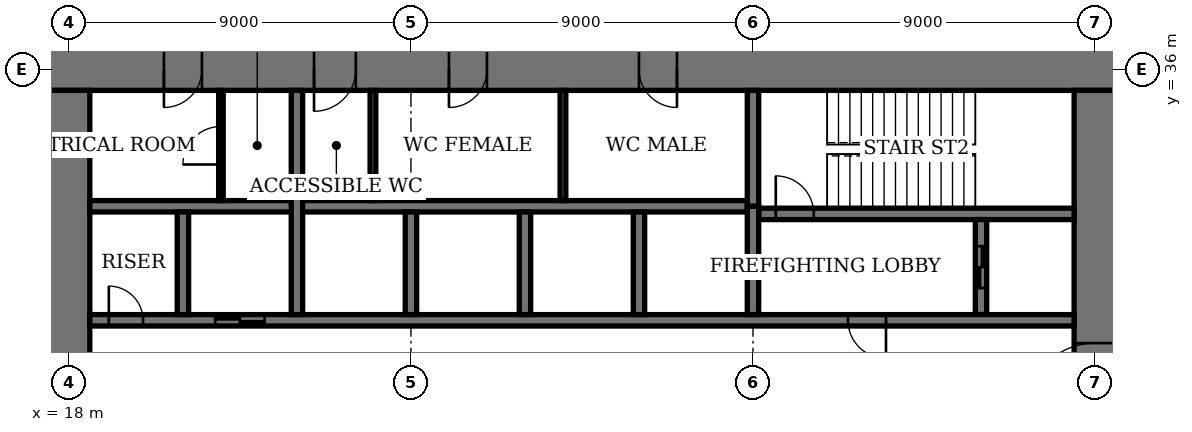
"""IFC4 building model, lengths in metres.
Left out: names, types, materials, properties, quantities, classifications, styles, units other than length and angle.
Written with IfcOpenShell. Run it as: python <this file> out.ifc"""

import sys

from ifc_helpers import new_model, si_unit, direction, frame, frame_2d, origin, place, context, subcontext, project, spatial, rectangle, extrude, element, fill, save


model = new_model("IFC4")
c1 = context("Model", 3, precision=1e-05, world=origin(), true_north=direction((0.0, 1.0)))
c2 = subcontext(c1, "Body", "Model", "MODEL_VIEW")
j1 = project(units=[si_unit("LENGTHUNIT", "METRE"), si_unit("PLANEANGLEUNIT", "RADIAN")], contexts=[c1])
p1 = place(None, origin())
s1 = spatial("IfcSite", under=j1, at=p1, CompositionType="ELEMENT")
p2 = place(p1, origin())
s2 = spatial("IfcBuilding", under=s1, at=p2, CompositionType="ELEMENT")
p3 = place(p2, frame((0.0, 0.0, 59.8)))
s3 = spatial("IfcBuildingStorey", under=s2, at=p3, CompositionType="ELEMENT", Elevation=59.8)
p4 = place(p3, frame((45.55, 36.0, 0.0), z_axis=(0.0, 0.0, 1.0), x_axis=(-1.0, 0.0, 0.0)))
e1 = element("IfcWall", 1, at=p4, inside=s3, PredefinedType="SHEAR", context=c2, shape_type="SweptSolid", body=[
    extrude(rectangle(XDim=28.1, YDim=1.1, at=frame_2d((14.05, 0.0))), origin(), (0.0, 0.0, 1.0), 4.0),
])
p5 = place(p4, frame((11.55, 0.0, 0.0)))
e2 = element("IfcOpeningElement", 2, at=p5, cuts=e1, PredefinedType="OPENING", context=c2, shape_type="SweptSolid", body=[
    extrude(rectangle(XDim=1.0, YDim=2.4, at=frame_2d((0.5, 1.2))), frame((0.0, 0.56, 0.0), z_axis=(0.0, -1.0, 0.0), x_axis=(1.0, 0.0, 0.0)), (0.0, 0.0, 1.0), 1.12),
])
p6 = place(p4, frame((16.55, 0.0, 0.0)))
e3 = element("IfcOpeningElement", 3, at=p6, cuts=e1, PredefinedType="OPENING", context=c2, shape_type="SweptSolid", body=[
    extrude(rectangle(XDim=1.0, YDim=2.4, at=frame_2d((0.5, 1.2))), frame((0.0, 0.56, 0.0), z_axis=(0.0, -1.0, 0.0), x_axis=(1.0, 0.0, 0.0)), (0.0, 0.0, 1.0), 1.12),
])
p7 = place(p4, frame((20.0, 0.0, 0.0)))
e4 = element("IfcOpeningElement", 4, at=p7, cuts=e1, PredefinedType="OPENING", context=c2, shape_type="SweptSolid", body=[
    extrude(rectangle(XDim=1.1, YDim=2.4, at=frame_2d((0.55, 1.2))), frame((0.0, 0.56, 0.0), z_axis=(0.0, -1.0, 0.0), x_axis=(1.0, 0.0, 0.0)), (0.0, 0.0, 1.0), 1.12),
])
p8 = place(p4, frame((24.05, 0.0, 0.0)))
e5 = element("IfcOpeningElement", 5, at=p8, cuts=e1, PredefinedType="OPENING", context=c2, shape_type="SweptSolid", body=[
    extrude(rectangle(XDim=1.0, YDim=2.4, at=frame_2d((0.5, 1.2))), frame((0.0, 0.56, 0.0), z_axis=(0.0, -1.0, 0.0), x_axis=(1.0, 0.0, 0.0)), (0.0, 0.0, 1.0), 1.12),
])
p9 = place(p3, frame((18.0, 35.45, 0.0), z_axis=(0.0, 0.0, 1.0), x_axis=(0.0, -1.0, 0.0)))
e6 = element("IfcWall", 6, at=p9, inside=s3, PredefinedType="SHEAR", context=c2, shape_type="SweptSolid", body=[
    extrude(rectangle(XDim=16.9, YDim=1.1, at=frame_2d((8.45, 0.0))), origin(), (0.0, 0.0, 1.0), 4.0),
])
p10 = place(p9, frame((8.45, 0.0, 0.0)))
e7 = element("IfcOpeningElement", 7, at=p10, cuts=e6, PredefinedType="OPENING", context=c2, shape_type="SweptSolid", body=[
    extrude(rectangle(XDim=1.8, YDim=2.4, at=frame_2d((0.9, 1.2))), frame((0.0, 0.56, 0.0), z_axis=(0.0, -1.0, 0.0), x_axis=(1.0, 0.0, 0.0)), (0.0, 0.0, 1.0), 1.12),
])
p11 = place(p3, frame((45.0, 18.55, 0.0), z_axis=(0.0, 0.0, 1.0), x_axis=(0.0, 1.0, 0.0)))
e8 = element("IfcWall", 8, at=p11, inside=s3, PredefinedType="SHEAR", context=c2, shape_type="SweptSolid", body=[
    extrude(rectangle(XDim=16.9, YDim=1.1, at=frame_2d((8.45, 0.0))), origin(), (0.0, 0.0, 1.0), 4.0),
])
p12 = place(p11, frame((8.45, 0.0, 0.0)))
e9 = element("IfcOpeningElement", 9, at=p12, cuts=e8, PredefinedType="OPENING", context=c2, shape_type="SweptSolid", body=[
    extrude(rectangle(XDim=1.8, YDim=2.4, at=frame_2d((0.9, 1.2))), frame((0.0, 0.56, 0.0), z_axis=(0.0, -1.0, 0.0), x_axis=(1.0, 0.0, 0.0)), (0.0, 0.0, 1.0), 1.12),
])
p13 = place(p3, frame((36.15, 32.2, 0.0), z_axis=(0.0, 0.0, 1.0), x_axis=(1.0, 0.0, 0.0)))
e10 = element("IfcWall", 10, at=p13, inside=s3, PredefinedType="SHEAR", context=c2, shape_type="SweptSolid", body=[
    extrude(rectangle(XDim=8.3, YDim=0.3, at=frame_2d((4.15, 0.0))), origin(), (0.0, 0.0, 1.0), 4.0),
])
p14 = place(p13, frame((0.45, 0.0, 0.0)))
e11 = element("IfcOpeningElement", 11, at=p14, cuts=e10, PredefinedType="OPENING", context=c2, shape_type="SweptSolid", body=[
    extrude(rectangle(XDim=1.0, YDim=2.4, at=frame_2d((0.5, 1.2))), frame((0.0, 0.16, 0.0), z_axis=(0.0, -1.0, 0.0), x_axis=(1.0, 0.0, 0.0)), (0.0, 0.0, 1.0), 0.32),
])
p15 = place(p3, frame((36.0, 32.4, 0.0), z_axis=(0.0, 0.0, 1.0), x_axis=(0.0, 1.0, 0.0)))
e12 = element("IfcWall", 12, at=p15, inside=s3, PredefinedType="SHEAR", context=c2, shape_type="SweptSolid", body=[
    extrude(rectangle(XDim=3.05, YDim=0.3, at=frame_2d((1.525, 0.0))), origin(), (0.0, 0.0, 1.0), 4.0),
])
p16 = place(p3, frame((42.0, 29.55, 0.0), z_axis=(0.0, 0.0, 1.0), x_axis=(0.0, 1.0, 0.0)))
e13 = element("IfcWall", 13, at=p16, inside=s3, PredefinedType="SHEAR", context=c2, shape_type="SweptSolid", body=[
    extrude(rectangle(XDim=2.5, YDim=0.3, at=frame_2d((1.25, 0.0))), origin(), (0.0, 0.0, 1.0), 4.0),
])
p17 = place(p16, frame((0.7, 0.0, 0.0)))
e14 = element("IfcOpeningElement", 14, at=p17, cuts=e13, PredefinedType="OPENING", context=c2, shape_type="SweptSolid", body=[
    extrude(rectangle(XDim=1.1, YDim=2.4, at=frame_2d((0.55, 1.2))), frame((0.0, 0.16, 0.0), z_axis=(0.0, -1.0, 0.0), x_axis=(1.0, 0.0, 0.0)), (0.0, 0.0, 1.0), 0.32),
])
p18 = place(p3, frame((18.55, 29.4, 0.0), z_axis=(0.0, 0.0, 1.0), x_axis=(1.0, 0.0, 0.0)))
e15 = element("IfcWall", 15, at=p18, inside=s3, PredefinedType="SHEAR", context=c2, shape_type="SweptSolid", body=[
    extrude(rectangle(XDim=25.9, YDim=0.3, at=frame_2d((12.95, 0.0))), origin(), (0.0, 0.0, 1.0), 4.0),
])
p19 = place(p18, frame((19.95, 0.0, 0.0)))
e16 = element("IfcOpeningElement", 16, at=p19, cuts=e15, PredefinedType="OPENING", context=c2, shape_type="SweptSolid", body=[
    extrude(rectangle(XDim=1.0, YDim=2.4, at=frame_2d((0.5, 1.2))), frame((0.0, 0.16, 0.0), z_axis=(0.0, -1.0, 0.0), x_axis=(1.0, 0.0, 0.0)), (0.0, 0.0, 1.0), 0.32),
])
p20 = place(p18, frame((0.5, 0.0, 0.0)))
e17 = element("IfcOpeningElement", 17, at=p20, cuts=e15, PredefinedType="OPENING", context=c2, shape_type="SweptSolid", body=[
    extrude(rectangle(XDim=0.9, YDim=2.1, at=frame_2d((0.45, 1.05))), frame((0.0, 0.16, 0.0), z_axis=(0.0, -1.0, 0.0), x_axis=(1.0, 0.0, 0.0)), (0.0, 0.0, 1.0), 0.32),
])
p21 = place(p18, frame((3.3, 0.0, 0.0)))
e18 = element("IfcOpeningElement", 18, at=p21, cuts=e15, PredefinedType="OPENING", context=c2, shape_type="SweptSolid", body=[
    extrude(rectangle(XDim=1.3, YDim=2.4, at=frame_2d((0.65, 1.2))), frame((0.0, 0.16, 0.0), z_axis=(0.0, -1.0, 0.0), x_axis=(1.0, 0.0, 0.0)), (0.0, 0.0, 1.0), 0.32),
])
p22 = place(p3, frame((18.55, 32.4, 0.0), z_axis=(0.0, 0.0, 1.0), x_axis=(1.0, 0.0, 0.0)))
e19 = element("IfcWall", 19, at=p22, inside=s3, PredefinedType="SHEAR", context=c2, shape_type="SweptSolid", body=[
    extrude(rectangle(XDim=17.3, YDim=0.3, at=frame_2d((8.65, 0.0))), origin(), (0.0, 0.0, 1.0), 4.0),
])
for number, where, z_axis, x_axis in (
    (20, (33.0, 29.55, 0.0), (0.0, 0.0, 1.0), (0.0, 1.0, 0.0)),
    (21, (30.0, 29.55, 0.0), (0.0, 0.0, 1.0), (0.0, 1.0, 0.0)),
    (22, (27.0, 29.55, 0.0), (0.0, 0.0, 1.0), (0.0, 1.0, 0.0)),
):
    element("IfcWall", number, at=place(p3, frame(where, z_axis=z_axis, x_axis=x_axis)), inside=s3, PredefinedType="SHEAR", context=c2, shape_type="SweptSolid", body=[
        extrude(rectangle(XDim=2.7, YDim=0.3, at=frame_2d((1.35, 0.0))), origin(), (0.0, 0.0, 1.0), 4.0),
    ])
p23 = place(p3, frame((24.0, 29.55, 0.0), z_axis=(0.0, 0.0, 1.0), x_axis=(0.0, 1.0, 0.0)))
e23 = element("IfcWall", 23, at=p23, inside=s3, PredefinedType="SHEAR", context=c2, shape_type="SweptSolid", body=[
    extrude(rectangle(XDim=5.9, YDim=0.3, at=frame_2d((2.95, 0.0))), origin(), (0.0, 0.0, 1.0), 4.0),
])
p24 = place(p3, frame((21.0, 29.55, 0.0), z_axis=(0.0, 0.0, 1.0), x_axis=(0.0, 1.0, 0.0)))
e24 = element("IfcWall", 24, at=p24, inside=s3, PredefinedType="SHEAR", context=c2, shape_type="SweptSolid", body=[
    extrude(rectangle(XDim=2.7, YDim=0.3, at=frame_2d((1.35, 0.0))), origin(), (0.0, 0.0, 1.0), 4.0),
])
p25 = place(p3, frame((36.0, 29.55, 0.0), z_axis=(0.0, 0.0, 1.0), x_axis=(0.0, 1.0, 0.0)))
e25 = element("IfcWall", 25, at=p25, inside=s3, PredefinedType="SHEAR", context=c2, shape_type="SweptSolid", body=[
    extrude(rectangle(XDim=2.85, YDim=0.3, at=frame_2d((1.425, 0.0))), origin(), (0.0, 0.0, 1.0), 4.0),
])
for number, where, z_axis, x_axis in (
    (26, (31.0, 32.55, 0.0), (0.0, 0.0, 1.0), (0.0, 1.0, 0.0)),
    (27, (26.0, 32.55, 0.0), (0.0, 0.0, 1.0), (0.0, 1.0, 0.0)),
):
    element("IfcWall", number, at=place(p3, frame(where, z_axis=z_axis, x_axis=x_axis)), inside=s3, PredefinedType="PARTITIONING", context=c2, shape_type="SweptSolid", body=[
        extrude(rectangle(XDim=2.9, YDim=0.15, at=frame_2d((1.45, 0.0))), origin(), (0.0, 0.0, 1.0), 3.75),
    ])
p26 = place(p3, frame((22.0, 32.55, 0.0), z_axis=(0.0, 0.0, 1.0), x_axis=(0.0, 1.0, 0.0)))
e28 = element("IfcWall", 28, at=p26, inside=s3, PredefinedType="PARTITIONING", context=c2, shape_type="SweptSolid", body=[
    extrude(rectangle(XDim=2.9, YDim=0.12, at=frame_2d((1.45, 0.0))), origin(), (0.0, 0.0, 1.0), 3.75),
])
p27 = place(p26, frame((0.95, 0.0, 0.0)))
e29 = element("IfcOpeningElement", 29, at=p27, cuts=e28, PredefinedType="OPENING", context=c2, shape_type="SweptSolid", body=[
    extrude(rectangle(XDim=1.0, YDim=2.4, at=frame_2d((0.5, 1.2))), frame((0.0, 0.07, 0.0), z_axis=(0.0, -1.0, 0.0), x_axis=(1.0, 0.0, 0.0)), (0.0, 0.0, 1.0), 0.14),
])
p28 = place(p12, origin())
e30 = element("IfcDoor", 30, at=p28, inside=s3, OperationType="DOUBLE_DOOR_DOUBLE_SWING", PredefinedType="DOOR", context=c2, shape_type="SweptSolid", body=[
    extrude(rectangle(XDim=1.8, YDim=2.4, at=frame_2d((0.9, 1.2))), frame((0.0, 0.03, 0.0), z_axis=(0.0, -1.0, 0.0), x_axis=(1.0, 0.0, 0.0)), (0.0, 0.0, 1.0), 0.06),
    extrude(rectangle(XDim=0.04, YDim=2.4, at=frame_2d((0.02, 1.2))), frame((0.0, 0.55, 0.0), z_axis=(0.0, -1.0, 0.0), x_axis=(1.0, 0.0, 0.0)), (0.0, 0.0, 1.0), 1.1),
    extrude(rectangle(XDim=0.04, YDim=2.4, at=frame_2d((1.78, 1.2))), frame((0.0, 0.55, 0.0), z_axis=(0.0, -1.0, 0.0), x_axis=(1.0, 0.0, 0.0)), (0.0, 0.0, 1.0), 1.1),
    extrude(rectangle(XDim=1.8, YDim=0.04, at=frame_2d((0.9, 2.38))), frame((0.0, 0.55, 0.0), z_axis=(0.0, -1.0, 0.0), x_axis=(1.0, 0.0, 0.0)), (0.0, 0.0, 1.0), 1.1),
])
fill(e9, e30)
p29 = place(p5, origin())
e31 = element("IfcDoor", 31, at=p29, inside=s3, OperationType="SINGLE_SWING_RIGHT", PredefinedType="DOOR", context=c2, shape_type="SweptSolid", body=[
    extrude(rectangle(XDim=1.0, YDim=2.4, at=frame_2d((0.5, 1.2))), frame((0.0, 0.025, 0.0), z_axis=(0.0, -1.0, 0.0), x_axis=(1.0, 0.0, 0.0)), (0.0, 0.0, 1.0), 0.05),
    extrude(rectangle(XDim=0.04, YDim=2.4, at=frame_2d((0.02, 1.2))), frame((0.0, 0.4, 0.0), z_axis=(0.0, -1.0, 0.0), x_axis=(1.0, 0.0, 0.0)), (0.0, 0.0, 1.0), 0.8),
    extrude(rectangle(XDim=0.04, YDim=2.4, at=frame_2d((0.98, 1.2))), frame((0.0, 0.4, 0.0), z_axis=(0.0, -1.0, 0.0), x_axis=(1.0, 0.0, 0.0)), (0.0, 0.0, 1.0), 0.8),
    extrude(rectangle(XDim=1.0, YDim=0.04, at=frame_2d((0.5, 2.38))), frame((0.0, 0.4, 0.0), z_axis=(0.0, -1.0, 0.0), x_axis=(1.0, 0.0, 0.0)), (0.0, 0.0, 1.0), 0.8),
])
fill(e2, e31)
p30 = place(p6, origin())
e32 = element("IfcDoor", 32, at=p30, inside=s3, OperationType="SINGLE_SWING_LEFT", PredefinedType="DOOR", context=c2, shape_type="SweptSolid", body=[
    extrude(rectangle(XDim=1.0, YDim=2.4, at=frame_2d((0.5, 1.2))), frame((0.0, 0.025, 0.0), z_axis=(0.0, -1.0, 0.0), x_axis=(1.0, 0.0, 0.0)), (0.0, 0.0, 1.0), 0.05),
    extrude(rectangle(XDim=0.04, YDim=2.4, at=frame_2d((0.02, 1.2))), frame((0.0, 0.4, 0.0), z_axis=(0.0, -1.0, 0.0), x_axis=(1.0, 0.0, 0.0)), (0.0, 0.0, 1.0), 0.8),
    extrude(rectangle(XDim=0.04, YDim=2.4, at=frame_2d((0.98, 1.2))), frame((0.0, 0.4, 0.0), z_axis=(0.0, -1.0, 0.0), x_axis=(1.0, 0.0, 0.0)), (0.0, 0.0, 1.0), 0.8),
    extrude(rectangle(XDim=1.0, YDim=0.04, at=frame_2d((0.5, 2.38))), frame((0.0, 0.4, 0.0), z_axis=(0.0, -1.0, 0.0), x_axis=(1.0, 0.0, 0.0)), (0.0, 0.0, 1.0), 0.8),
])
fill(e3, e32)
p31 = place(p7, origin())
e33 = element("IfcDoor", 33, at=p31, inside=s3, OperationType="SINGLE_SWING_LEFT", PredefinedType="DOOR", context=c2, shape_type="SweptSolid", body=[
    extrude(rectangle(XDim=1.1, YDim=2.4, at=frame_2d((0.55, 1.2))), frame((0.0, 0.025, 0.0), z_axis=(0.0, -1.0, 0.0), x_axis=(1.0, 0.0, 0.0)), (0.0, 0.0, 1.0), 0.05),
    extrude(rectangle(XDim=0.04, YDim=2.4, at=frame_2d((0.02, 1.2))), frame((0.0, 0.44, 0.0), z_axis=(0.0, -1.0, 0.0), x_axis=(1.0, 0.0, 0.0)), (0.0, 0.0, 1.0), 0.88),
    extrude(rectangle(XDim=0.04, YDim=2.4, at=frame_2d((1.08, 1.2))), frame((0.0, 0.44, 0.0), z_axis=(0.0, -1.0, 0.0), x_axis=(1.0, 0.0, 0.0)), (0.0, 0.0, 1.0), 0.88),
    extrude(rectangle(XDim=1.1, YDim=0.04, at=frame_2d((0.55, 2.38))), frame((0.0, 0.44, 0.0), z_axis=(0.0, -1.0, 0.0), x_axis=(1.0, 0.0, 0.0)), (0.0, 0.0, 1.0), 0.88),
])
fill(e4, e33)
p32 = place(p8, origin())
e34 = element("IfcDoor", 34, at=p32, inside=s3, OperationType="SINGLE_SWING_LEFT", PredefinedType="DOOR", context=c2, shape_type="SweptSolid", body=[
    extrude(rectangle(XDim=1.0, YDim=2.4, at=frame_2d((0.5, 1.2))), frame((0.0, 0.025, 0.0), z_axis=(0.0, -1.0, 0.0), x_axis=(1.0, 0.0, 0.0)), (0.0, 0.0, 1.0), 0.05),
    extrude(rectangle(XDim=0.04, YDim=2.4, at=frame_2d((0.02, 1.2))), frame((0.0, 0.4, 0.0), z_axis=(0.0, -1.0, 0.0), x_axis=(1.0, 0.0, 0.0)), (0.0, 0.0, 1.0), 0.8),
    extrude(rectangle(XDim=0.04, YDim=2.4, at=frame_2d((0.98, 1.2))), frame((0.0, 0.4, 0.0), z_axis=(0.0, -1.0, 0.0), x_axis=(1.0, 0.0, 0.0)), (0.0, 0.0, 1.0), 0.8),
    extrude(rectangle(XDim=1.0, YDim=0.04, at=frame_2d((0.5, 2.38))), frame((0.0, 0.4, 0.0), z_axis=(0.0, -1.0, 0.0), x_axis=(1.0, 0.0, 0.0)), (0.0, 0.0, 1.0), 0.8),
])
fill(e5, e34)
p33 = place(p14, origin())
e35 = element("IfcDoor", 35, at=p33, inside=s3, OperationType="SINGLE_SWING_RIGHT", PredefinedType="DOOR", context=c2, shape_type="SweptSolid", body=[
    extrude(rectangle(XDim=1.0, YDim=2.4, at=frame_2d((0.5, 1.2))), frame((0.0, 0.03, 0.0), z_axis=(0.0, -1.0, 0.0), x_axis=(1.0, 0.0, 0.0)), (0.0, 0.0, 1.0), 0.06),
])
fill(e11, e35)
p34 = place(p19, origin())
e36 = element("IfcDoor", 36, at=p34, inside=s3, OperationType="SINGLE_SWING_RIGHT", PredefinedType="DOOR", context=c2, shape_type="SweptSolid", body=[
    extrude(rectangle(XDim=1.0, YDim=2.4, at=frame_2d((0.5, 1.2))), frame((0.0, 0.03, 0.0), z_axis=(0.0, -1.0, 0.0), x_axis=(1.0, 0.0, 0.0)), (0.0, 0.0, 1.0), 0.06),
])
fill(e16, e36)
p35 = place(p20, origin())
e37 = element("IfcDoor", 37, at=p35, inside=s3, OperationType="SINGLE_SWING_RIGHT", PredefinedType="DOOR", context=c2, shape_type="SweptSolid", body=[
    extrude(rectangle(XDim=0.9, YDim=2.1, at=frame_2d((0.45, 1.05))), frame((0.0, 0.03, 0.0), z_axis=(0.0, -1.0, 0.0), x_axis=(1.0, 0.0, 0.0)), (0.0, 0.0, 1.0), 0.06),
])
fill(e17, e37)
p36 = place(p27, origin())
e38 = element("IfcDoor", 38, at=p36, inside=s3, OperationType="SINGLE_SWING_RIGHT", PredefinedType="DOOR", context=c2, shape_type="SweptSolid", body=[
    extrude(rectangle(XDim=1.0, YDim=2.4, at=frame_2d((0.5, 1.2))), frame((0.0, 0.03, 0.0), z_axis=(0.0, -1.0, 0.0), x_axis=(1.0, 0.0, 0.0)), (0.0, 0.0, 1.0), 0.06),
])
fill(e29, e38)
p37 = place(p21, origin())
e39 = element("IfcDoor", 39, at=p37, inside=s3, OperationType="DOUBLE_DOOR_SLIDING", PredefinedType="DOOR", context=c2, shape_type="SweptSolid", body=[
    extrude(rectangle(XDim=1.3, YDim=2.4, at=frame_2d((0.65, 1.2))), frame((0.0, 0.02, 0.0), z_axis=(0.0, -1.0, 0.0), x_axis=(1.0, 0.0, 0.0)), (0.0, 0.0, 1.0), 0.04),
])
fill(e18, e39)
p38 = place(p17, origin())
e40 = element("IfcDoor", 40, at=p38, inside=s3, OperationType="DOUBLE_DOOR_SLIDING", PredefinedType="DOOR", context=c2, shape_type="SweptSolid", body=[
    extrude(rectangle(XDim=1.1, YDim=2.4, at=frame_2d((0.55, 1.2))), frame((0.0, 0.03, 0.0), z_axis=(0.0, -1.0, 0.0), x_axis=(1.0, 0.0, 0.0)), (0.0, 0.0, 1.0), 0.06),
])
fill(e14, e40)
save(model, sys.argv[1])
